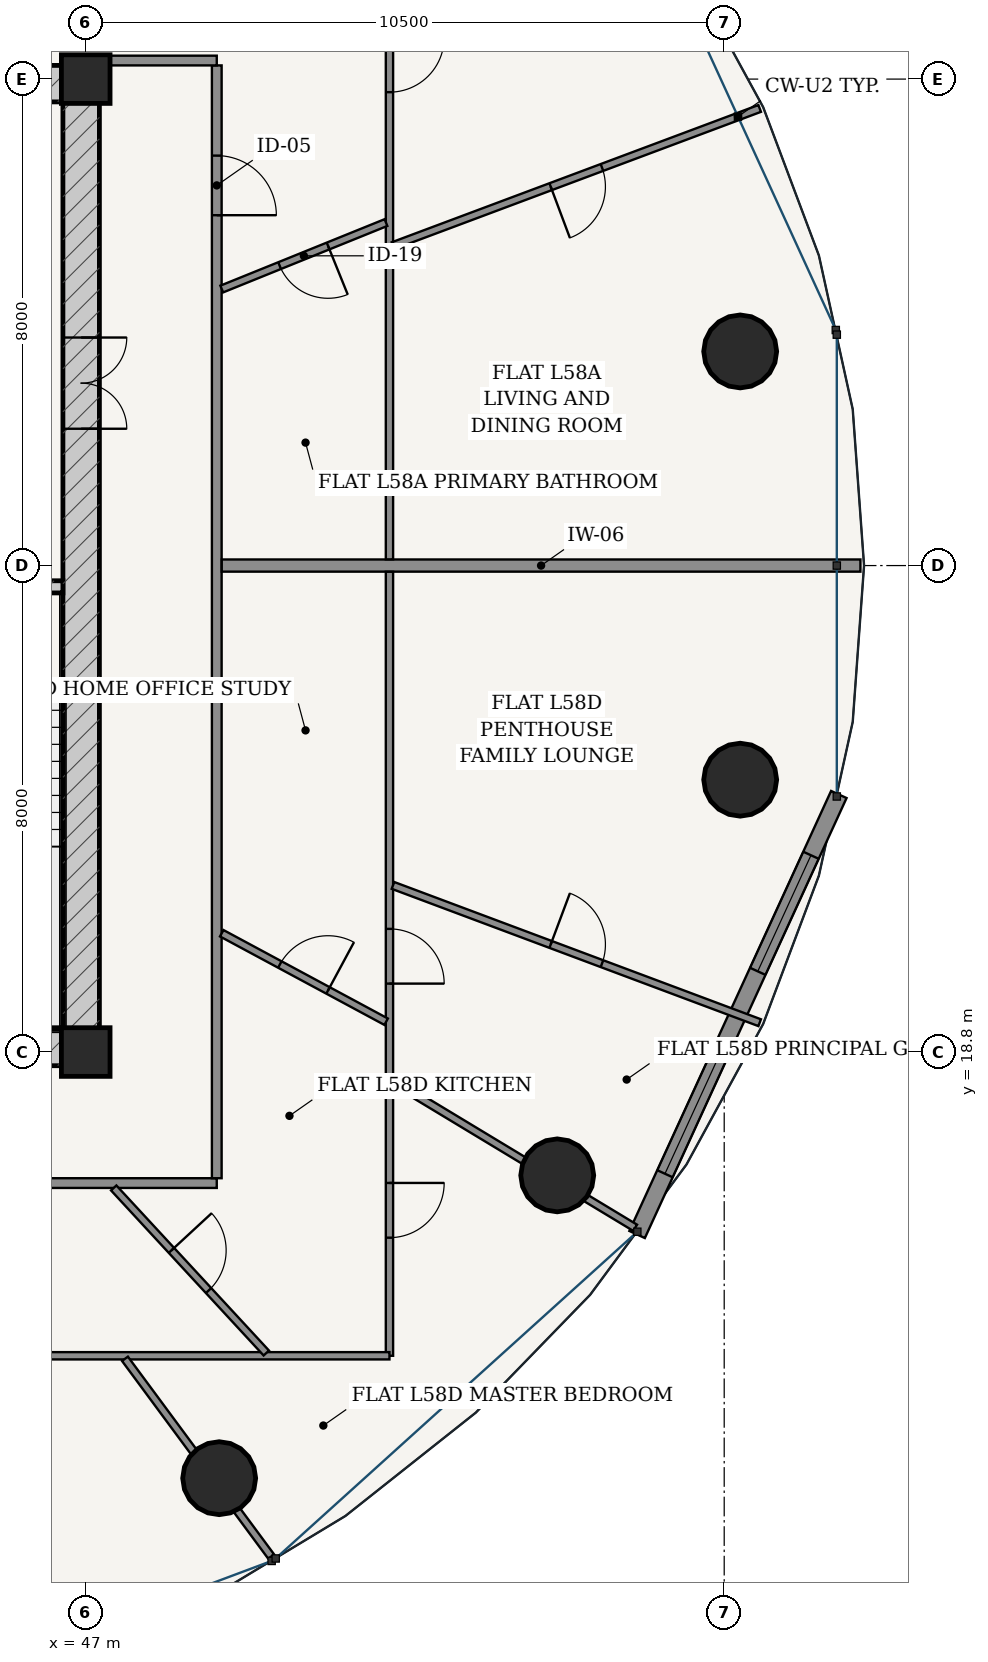
"""IFC4 building model, lengths in metres.
Left out: names, types, materials, properties, quantities, classifications, styles, units other than length and angle.
Written with IfcOpenShell. Run it as: python <this file> out.ifc"""

import sys

from ifc_helpers import new_model, si_unit, direction, frame, frame_2d, origin, origin_2d, place, context, subcontext, project, spatial, rectangle, hollow_circle, extrude, source, transform, mapped, element, fill, save


model = new_model("IFC4")
c1 = context("Model", 3, precision=1e-05, world=origin(), true_north=direction((-0.2419218956, 0.970295726276)))
c2 = subcontext(c1, "Body", "Model", "MODEL_VIEW")
j1 = project(units=[si_unit("LENGTHUNIT", "METRE"), si_unit("PLANEANGLEUNIT", "RADIAN")], contexts=[c1])
p1 = place(None, origin())
s1 = spatial("IfcSite", under=j1, at=p1, CompositionType="ELEMENT")
p2 = place(p1, origin())
s2 = spatial("IfcBuilding", under=s1, at=p2, CompositionType="ELEMENT")
p3 = place(p2, frame((0.0, 0.0, 220.8)))
s3 = spatial("IfcBuildingStorey", under=s2, at=p3, CompositionType="ELEMENT", Elevation=220.8)
for number, where, z_axis, x_axis in (
    (1, (47.0, 18.8, 0.0), (0.0, 0.0, 1.0), (1.0, 0.0, 0.0)),
    (2, (47.0, 34.8, 0.0), (0.0, 0.0, 1.0), (1.0, 0.0, 0.0)),
):
    element("IfcColumn", number, at=place(p3, frame(where, z_axis=z_axis, x_axis=x_axis)), inside=s3, PredefinedType="COLUMN", context=c2, shape_type="SweptSolid", body=[
        extrude(rectangle(XDim=0.8, YDim=0.8, at=origin_2d()), origin(), (0.0, 0.0, 1.0), 3.7),
    ])
p4 = place(p3, frame((28.775, 18.875, 0.0), z_axis=(0.0, 0.0, 1.0), x_axis=(1.0, 0.0, 0.0)))
e3 = element("IfcWall", 3, at=p4, inside=s3, PredefinedType="SHEAR", context=c2, shape_type="SweptSolid", body=[
    extrude(rectangle(XDim=18.45, YDim=0.6, at=frame_2d((9.225, 0.0))), origin(), (0.0, 0.0, 1.0), 3.435),
])
p5 = place(p4, frame((7.46, 0.0, 0.0)))
e4 = element("IfcOpeningElement", 4, at=p5, cuts=e3, PredefinedType="OPENING", context=c2, shape_type="SweptSolid", body=[
    extrude(rectangle(XDim=0.85, YDim=2.1, at=frame_2d((0.425, 1.05))), frame((0.0, 0.31, 0.0), z_axis=(0.0, -1.0, 0.0), x_axis=(1.0, 0.0, 0.0)), (0.0, 0.0, 1.0), 0.62),
])
p6 = place(p4, frame((10.54, 0.0, 0.0)))
e5 = element("IfcOpeningElement", 5, at=p6, cuts=e3, PredefinedType="OPENING", context=c2, shape_type="SweptSolid", body=[
    extrude(rectangle(XDim=0.85, YDim=2.1, at=frame_2d((0.425, 1.05))), frame((0.0, 0.31, 0.0), z_axis=(0.0, -1.0, 0.0), x_axis=(1.0, 0.0, 0.0)), (0.0, 0.0, 1.0), 0.62),
])
p7 = place(p3, frame((28.775, 34.725, 0.0), z_axis=(0.0, 0.0, 1.0), x_axis=(1.0, 0.0, 0.0)))
e6 = element("IfcWall", 6, at=p7, inside=s3, PredefinedType="SHEAR", context=c2, shape_type="SweptSolid", body=[
    extrude(rectangle(XDim=18.45, YDim=0.6, at=frame_2d((9.225, 0.0))), origin(), (0.0, 0.0, 1.0), 3.435),
])
p8 = place(p3, frame((46.925, 19.175, 0.0), z_axis=(0.0, 0.0, 1.0), x_axis=(0.0, 1.0, 0.0)))
e7 = element("IfcWall", 7, at=p8, inside=s3, PredefinedType="SHEAR", context=c2, shape_type="SweptSolid", body=[
    extrude(rectangle(XDim=15.25, YDim=0.6, at=frame_2d((7.625, 0.0))), origin(), (0.0, 0.0, 1.0), 3.435),
])
p9 = place(p8, frame((9.875, 0.0, 0.0)))
e8 = element("IfcOpeningElement", 8, at=p9, cuts=e7, PredefinedType="OPENING", context=c2, shape_type="SweptSolid", body=[
    extrude(rectangle(XDim=1.5, YDim=2.2, at=frame_2d((0.75, 1.1))), frame((0.0, 0.31, 0.0), z_axis=(0.0, -1.0, 0.0), x_axis=(1.0, 0.0, 0.0)), (0.0, 0.0, 1.0), 0.62),
])
p10 = place(p3, frame((43.305, 26.45, 0.0), z_axis=(0.0, 0.0, 1.0), x_axis=(1.0, 0.0, 0.0)))
e9 = element("IfcWall", 9, at=p10, inside=s3, PredefinedType="SOLIDWALL", context=c2, shape_type="SweptSolid", body=[
    extrude(rectangle(XDim=3.32, YDim=0.2, at=frame_2d((1.66, 0.0))), origin(), (0.0, 0.0, 1.0), 3.435),
])
p11 = place(p10, frame((1.185, 0.0, 0.0)))
e10 = element("IfcOpeningElement", 10, at=p11, cuts=e9, PredefinedType="OPENING", context=c2, shape_type="SweptSolid", body=[
    extrude(rectangle(XDim=0.95, YDim=2.15, at=frame_2d((0.475, 1.075))), frame((0.0, 0.11, 0.0), z_axis=(0.0, -1.0, 0.0), x_axis=(1.0, 0.0, 0.0)), (0.0, 0.0, 1.0), 0.22),
])
for number, where, z_axis, x_axis in (
    (11, (57.763, 30.321, 0.0), (0.0, 0.0, 1.0), (1.0, 0.0, 0.0)),
    (12, (49.195, 11.792, 0.0), (0.0, 0.0, 1.0), (1.0, 0.0, 0.0)),
    (13, (54.754, 16.772, 0.0), (0.0, 0.0, 1.0), (1.0, 0.0, 0.0)),
    (14, (57.763, 23.279, 0.0), (0.0, 0.0, 1.0), (1.0, 0.0, 0.0)),
):
    element("IfcColumn", number, at=place(p3, frame(where, z_axis=z_axis, x_axis=x_axis)), inside=s3, PredefinedType="COLUMN", context=c2, shape_type="SweptSolid", body=[
        extrude(hollow_circle(Radius=0.6, WallThickness=0.038, at=origin_2d()), origin(), (0.0, 0.0, 1.0), 3.7),
    ])
p12 = place(p3, frame((56.068, 15.799, 0.0), z_axis=(0.0, 0.0, 1.0), x_axis=(0.416717018135, 0.909036262641, 0.0)))
e15 = element("IfcWall", 15, at=p12, inside=s3, PredefinedType="SOLIDWALL", context=c2, shape_type="SweptSolid", body=[
    extrude(rectangle(XDim=7.96, YDim=0.28, at=frame_2d((3.98, 0.0))), origin(), (0.0, 0.0, 1.0), 3.435),
])
p13 = place(p12, frame((1.099, 0.0, 0.85)))
e16 = element("IfcOpeningElement", 16, at=p13, cuts=e15, PredefinedType="OPENING", context=c2, shape_type="SweptSolid", body=[
    extrude(rectangle(XDim=2.1, YDim=1.95, at=frame_2d((1.05, 0.975))), frame((0.0, 0.15, 0.0), z_axis=(0.0, -1.0, 0.0), x_axis=(1.0, 0.0, 0.0)), (0.0, 0.0, 1.0), 0.3),
])
p14 = place(p12, frame((4.761, 0.0, 0.85)))
e17 = element("IfcOpeningElement", 17, at=p14, cuts=e15, PredefinedType="OPENING", context=c2, shape_type="SweptSolid", body=[
    extrude(rectangle(XDim=2.1, YDim=1.95, at=frame_2d((1.05, 0.975))), frame((0.0, 0.15, 0.0), z_axis=(0.0, -1.0, 0.0), x_axis=(1.0, 0.0, 0.0)), (0.0, 0.0, 1.0), 0.3),
])
p15 = place(p3, frame((34.32, 16.645, 0.0), z_axis=(0.0, 0.0, 1.0), x_axis=(1.0, 0.0, 0.0)))
e18 = element("IfcWall", 18, at=p15, inside=s3, PredefinedType="PARTITIONING", context=c2, shape_type="SweptSolid", body=[
    extrude(rectangle(XDim=14.835, YDim=0.16, at=frame_2d((7.417, 0.0))), origin(), (0.0, 0.0, 1.0), 2.951),
])
p16 = place(p15, frame((8.973, 0.0, 0.0)))
e19 = element("IfcOpeningElement", 19, at=p16, cuts=e18, PredefinedType="OPENING", context=c2, shape_type="SweptSolid", body=[
    extrude(rectangle(XDim=0.98, YDim=2.2, at=frame_2d((0.49, 1.1))), frame((0.0, 0.09, 0.0), z_axis=(0.0, -1.0, 0.0), x_axis=(1.0, 0.0, 0.0)), (0.0, 0.0, 1.0), 0.18),
])
p17 = place(p3, frame((49.155, 16.725, 0.0), z_axis=(0.0, 0.0, 1.0), x_axis=(0.0, 1.0, 0.0)))
e20 = element("IfcWall", 20, at=p17, inside=s3, PredefinedType="PARTITIONING", context=c2, shape_type="SweptSolid", body=[
    extrude(rectangle(XDim=18.3, YDim=0.16, at=frame_2d((9.15, 0.0))), origin(), (0.0, 0.0, 1.0), 2.951),
])
p18 = place(p17, frame((15.837, 0.0, 0.0)))
e21 = element("IfcOpeningElement", 21, at=p18, cuts=e20, PredefinedType="OPENING", context=c2, shape_type="SweptSolid", body=[
    extrude(rectangle(XDim=0.98, YDim=2.2, at=frame_2d((0.49, 1.1))), frame((0.0, 0.09, 0.0), z_axis=(0.0, -1.0, 0.0), x_axis=(1.0, 0.0, 0.0)), (0.0, 0.0, 1.0), 0.18),
])
p19 = place(p3, frame((47.225, 35.105, 0.0), z_axis=(0.0, 0.0, 1.0), x_axis=(1.0, 0.0, 0.0)))
e22 = element("IfcWall", 22, at=p19, inside=s3, PredefinedType="PARTITIONING", context=c2, shape_type="SweptSolid", body=[
    extrude(rectangle(XDim=1.93, YDim=0.16, at=frame_2d((0.965, 0.0))), origin(), (0.0, 0.0, 1.0), 3.435),
])
p20 = place(p3, frame((49.237, 26.8, 0.0), z_axis=(0.0, 0.0, 1.0), x_axis=(1.0, 0.0, 0.0)))
e23 = element("IfcWall", 23, at=p20, inside=s3, PredefinedType="PARTITIONING", context=c2, shape_type="SweptSolid", body=[
    extrude(rectangle(XDim=10.503, YDim=0.2, at=frame_2d((5.251, 0.0))), origin(), (0.0, 0.0, 1.0), 2.951),
])
p21 = place(p3, frame((51.995, 37.945, 0.0), z_axis=(0.0, 0.0, 1.0), x_axis=(0.0, -1.0, 0.0)))
e24 = element("IfcWall", 24, at=p21, inside=s3, PredefinedType="PARTITIONING", context=c2, shape_type="SweptSolid", body=[
    extrude(rectangle(XDim=11.043, YDim=0.12, at=frame_2d((5.521, 0.0))), origin(), (0.0, 0.0, 1.0), 2.951),
])
p22 = place(p21, frame((2.46, 0.0, 0.0)))
e25 = element("IfcOpeningElement", 25, at=p22, cuts=e24, PredefinedType="OPENING", context=c2, shape_type="SweptSolid", body=[
    extrude(rectangle(XDim=0.9, YDim=2.15, at=frame_2d((0.45, 1.075))), frame((0.0, 0.07, 0.0), z_axis=(0.0, -1.0, 0.0), x_axis=(1.0, 0.0, 0.0)), (0.0, 0.0, 1.0), 0.14),
])
p23 = place(p3, frame((52.053, 32.06, 0.0), z_axis=(0.0, 0.0, 1.0), x_axis=(0.936547148815, 0.350541635255, 0.0)))
e26 = element("IfcWall", 26, at=p23, inside=s3, PredefinedType="PARTITIONING", context=c2, shape_type="SweptSolid", body=[
    extrude(rectangle(XDim=6.439, YDim=0.12, at=frame_2d((3.219, 0.0))), origin(), (0.0, 0.0, 1.0), 2.951),
])
p24 = place(p23, frame((2.769, 0.0, 0.0)))
e27 = element("IfcOpeningElement", 27, at=p24, cuts=e26, PredefinedType="OPENING", context=c2, shape_type="SweptSolid", body=[
    extrude(rectangle(XDim=0.9, YDim=2.15, at=frame_2d((0.45, 1.075))), frame((0.0, 0.07, 0.0), z_axis=(0.0, -1.0, 0.0), x_axis=(1.0, 0.0, 0.0)), (0.0, 0.0, 1.0), 0.14),
])
p25 = place(p3, frame((49.237, 31.347, 0.0), z_axis=(0.0, 0.0, 1.0), x_axis=(0.926960690293, 0.375158471383, 0.0)))
e28 = element("IfcWall", 28, at=p25, inside=s3, PredefinedType="PARTITIONING", context=c2, shape_type="SweptSolid", body=[
    extrude(rectangle(XDim=2.914, YDim=0.12, at=frame_2d((1.457, 0.0))), origin(), (0.0, 0.0, 1.0), 3.11),
])
p26 = place(p25, frame((1.027, 0.0, 0.0)))
e29 = element("IfcOpeningElement", 29, at=p26, cuts=e28, PredefinedType="OPENING", context=c2, shape_type="SweptSolid", body=[
    extrude(rectangle(XDim=0.86, YDim=2.15, at=frame_2d((0.43, 1.075))), frame((0.0, 0.07, 0.0), z_axis=(0.0, -1.0, 0.0), x_axis=(1.0, 0.0, 0.0)), (0.0, 0.0, 1.0), 0.14),
])
p27 = place(p3, frame((51.995, 26.698, 0.0), z_axis=(0.0, 0.0, 1.0), x_axis=(0.0, -1.0, 0.0)))
e30 = element("IfcWall", 30, at=p27, inside=s3, PredefinedType="PARTITIONING", context=c2, shape_type="SweptSolid", body=[
    extrude(rectangle(XDim=12.893, YDim=0.12, at=frame_2d((6.447, 0.0))), origin(), (0.0, 0.0, 1.0), 2.951),
])
p28 = place(p27, frame((10.051, 0.0, 0.0)))
e31 = element("IfcOpeningElement", 31, at=p28, cuts=e30, PredefinedType="OPENING", context=c2, shape_type="SweptSolid", body=[
    extrude(rectangle(XDim=0.9, YDim=2.15, at=frame_2d((0.45, 1.075))), frame((0.0, 0.07, 0.0), z_axis=(0.0, -1.0, 0.0), x_axis=(1.0, 0.0, 0.0)), (0.0, 0.0, 1.0), 0.14),
])
p29 = place(p27, frame((5.873, 0.0, 0.0)))
e32 = element("IfcOpeningElement", 32, at=p29, cuts=e30, PredefinedType="OPENING", context=c2, shape_type="SweptSolid", body=[
    extrude(rectangle(XDim=0.9, YDim=2.15, at=frame_2d((0.45, 1.075))), frame((0.0, 0.07, 0.0), z_axis=(0.0, -1.0, 0.0), x_axis=(1.0, 0.0, 0.0)), (0.0, 0.0, 1.0), 0.14),
])
p30 = place(p3, frame((51.995, 13.805, 0.0), z_axis=(0.0, 0.0, 1.0), x_axis=(-1.0, 0.0, 0.0)))
e33 = element("IfcWall", 33, at=p30, inside=s3, PredefinedType="PARTITIONING", context=c2, shape_type="SweptSolid", body=[
    extrude(rectangle(XDim=16.753, YDim=0.12, at=frame_2d((8.377, 0.0))), origin(), (0.0, 0.0, 1.0), 2.951),
])
p31 = place(p30, frame((7.442, 0.0, 0.0)))
e34 = element("IfcOpeningElement", 34, at=p31, cuts=e33, PredefinedType="OPENING", context=c2, shape_type="SweptSolid", body=[
    extrude(rectangle(XDim=0.9, YDim=2.15, at=frame_2d((0.45, 1.075))), frame((0.0, 0.07, 0.0), z_axis=(0.0, -1.0, 0.0), x_axis=(1.0, 0.0, 0.0)), (0.0, 0.0, 1.0), 0.14),
])
p32 = place(p3, frame((47.646, 13.755, 0.0), z_axis=(0.0, 0.0, 1.0), x_axis=(0.594518373783, -0.80408202519, 0.0)))
e35 = element("IfcWall", 35, at=p32, inside=s3, PredefinedType="PARTITIONING", context=c2, shape_type="SweptSolid", body=[
    extrude(rectangle(XDim=4.044, YDim=0.12, at=frame_2d((2.022, 0.0))), origin(), (0.0, 0.0, 1.0), 2.951),
])
p33 = place(p3, frame((52.048, 18.318, 0.0), z_axis=(0.0, 0.0, 1.0), x_axis=(0.856051317976, -0.516890840499, 0.0)))
e36 = element("IfcWall", 36, at=p33, inside=s3, PredefinedType="PARTITIONING", context=c2, shape_type="SweptSolid", body=[
    extrude(rectangle(XDim=4.658, YDim=0.12, at=frame_2d((2.329, 0.0))), origin(), (0.0, 0.0, 1.0), 2.951),
])
p34 = place(p3, frame((52.053, 21.54, 0.0), z_axis=(0.0, 0.0, 1.0), x_axis=(0.936534700322, -0.350574892274, 0.0)))
e37 = element("IfcWall", 37, at=p34, inside=s3, PredefinedType="PARTITIONING", context=c2, shape_type="SweptSolid", body=[
    extrude(rectangle(XDim=6.439, YDim=0.12, at=frame_2d((3.219, 0.0))), origin(), (0.0, 0.0, 1.0), 2.951),
])
p35 = place(p34, frame((2.769, 0.0, 0.0)))
e38 = element("IfcOpeningElement", 38, at=p35, cuts=e37, PredefinedType="OPENING", context=c2, shape_type="SweptSolid", body=[
    extrude(rectangle(XDim=0.9, YDim=2.15, at=frame_2d((0.45, 1.075))), frame((0.0, 0.07, 0.0), z_axis=(0.0, -1.0, 0.0), x_axis=(1.0, 0.0, 0.0)), (0.0, 0.0, 1.0), 0.14),
])
p36 = place(p3, frame((47.46, 16.565, 0.0), z_axis=(0.0, 0.0, 1.0), x_axis=(0.678787443458, -0.734334805524, 0.0)))
e39 = element("IfcWall", 39, at=p36, inside=s3, PredefinedType="PARTITIONING", context=c2, shape_type="SweptSolid", body=[
    extrude(rectangle(XDim=3.696, YDim=0.12, at=frame_2d((1.848, 0.0))), origin(), (0.0, 0.0, 1.0), 2.951),
])
p37 = place(p36, frame((1.398, 0.0, 0.0)))
e40 = element("IfcOpeningElement", 40, at=p37, cuts=e39, PredefinedType="OPENING", context=c2, shape_type="SweptSolid", body=[
    extrude(rectangle(XDim=0.9, YDim=2.15, at=frame_2d((0.45, 1.075))), frame((0.0, 0.07, 0.0), z_axis=(0.0, -1.0, 0.0), x_axis=(1.0, 0.0, 0.0)), (0.0, 0.0, 1.0), 0.14),
])
p38 = place(p3, frame((49.237, 20.753, 0.0), z_axis=(0.0, 0.0, 1.0), x_axis=(0.880601289356, -0.473857963091, 0.0)))
e41 = element("IfcWall", 41, at=p38, inside=s3, PredefinedType="PARTITIONING", context=c2, shape_type="SweptSolid", body=[
    extrude(rectangle(XDim=3.07, YDim=0.12, at=frame_2d((1.535, 0.0))), origin(), (0.0, 0.0, 1.0), 3.11),
])
p39 = place(p38, frame((1.085, 0.0, 0.0)))
e42 = element("IfcOpeningElement", 42, at=p39, cuts=e41, PredefinedType="OPENING", context=c2, shape_type="SweptSolid", body=[
    extrude(rectangle(XDim=0.9, YDim=2.15, at=frame_2d((0.45, 1.075))), frame((0.0, 0.07, 0.0), z_axis=(0.0, -1.0, 0.0), x_axis=(1.0, 0.0, 0.0)), (0.0, 0.0, 1.0), 0.14),
])
m1 = source(origin(), c2, "Body", "SweptSolid", [
    extrude(rectangle(XDim=2.1, YDim=1.95, at=frame_2d((1.05, 0.975))), frame((0.0, 0.03, 0.0), z_axis=(0.0, -1.0, 0.0), x_axis=(1.0, 0.0, 0.0)), (0.0, 0.0, 1.0), 0.06),
])
p40 = place(p13, origin())
e43 = element("IfcWindow", 43, at=p40, inside=s3, PartitioningType="SINGLE_PANEL", PredefinedType="WINDOW", context=c2, shape_type="MappedRepresentation", body=[
    mapped(m1, transform((0.0, 0.0, 0.0), scale=1.0)),
])
fill(e16, e43)
p41 = place(p14, origin())
e44 = element("IfcWindow", 44, at=p41, inside=s3, PartitioningType="SINGLE_PANEL", PredefinedType="WINDOW", context=c2, shape_type="MappedRepresentation", body=[
    mapped(m1, transform((0.0, 0.0, 0.0), scale=1.0)),
])
fill(e17, e44)
m2 = source(origin(), c2, "Body", "SweptSolid", [
    extrude(rectangle(XDim=1.5, YDim=2.2, at=frame_2d((0.75, 1.1))), frame((0.0, 0.025, 0.0), z_axis=(0.0, -1.0, 0.0), x_axis=(1.0, 0.0, 0.0)), (0.0, 0.0, 1.0), 0.05),
])
p42 = place(p9, frame((1.5, 0.0, 0.0), z_axis=(0.0, 0.0, 1.0), x_axis=(-1.0, 0.0, 0.0)))
e45 = element("IfcDoor", 45, at=p42, inside=s3, OperationType="DOUBLE_DOOR_SINGLE_SWING", PredefinedType="DOOR", context=c2, shape_type="MappedRepresentation", body=[
    mapped(m2, transform((0.0, 0.0, 0.0), scale=1.0)),
])
fill(e8, e45)
m3 = source(origin(), c2, "Body", "SweptSolid", [
    extrude(rectangle(XDim=0.98, YDim=2.2, at=frame_2d((0.49, 1.1))), frame((0.0, 0.025, 0.0), z_axis=(0.0, -1.0, 0.0), x_axis=(1.0, 0.0, 0.0)), (0.0, 0.0, 1.0), 0.05),
])
p43 = place(p18, frame((0.98, 0.0, 0.0), z_axis=(0.0, 0.0, 1.0), x_axis=(-1.0, 0.0, 0.0)))
e46 = element("IfcDoor", 46, at=p43, inside=s3, OperationType="SINGLE_SWING_RIGHT", PredefinedType="DOOR", context=c2, shape_type="MappedRepresentation", body=[
    mapped(m3, transform((0.0, 0.0, 0.0), scale=1.0)),
])
fill(e21, e46)
m4 = source(origin(), c2, "Body", "SweptSolid", [
    extrude(rectangle(XDim=0.86, YDim=2.15, at=frame_2d((0.43, 1.075))), frame((0.0, 0.025, 0.0), z_axis=(0.0, -1.0, 0.0), x_axis=(1.0, 0.0, 0.0)), (0.0, 0.0, 1.0), 0.05),
])
p44 = place(p26, frame((0.86, 0.0, 0.0), z_axis=(0.0, 0.0, 1.0), x_axis=(-1.0, 0.0, 0.0)))
e47 = element("IfcDoor", 47, at=p44, inside=s3, OperationType="SINGLE_SWING_LEFT", PredefinedType="DOOR", context=c2, shape_type="MappedRepresentation", body=[
    mapped(m4, transform((0.0, 0.0, 0.0), scale=1.0)),
])
fill(e29, e47)
m5 = source(origin(), c2, "Body", "SweptSolid", [
    extrude(rectangle(XDim=0.9, YDim=2.15, at=frame_2d((0.45, 1.075))), frame((0.0, 0.025, 0.0), z_axis=(0.0, -1.0, 0.0), x_axis=(1.0, 0.0, 0.0)), (0.0, 0.0, 1.0), 0.05),
])
p45 = place(p22, origin())
e48 = element("IfcDoor", 48, at=p45, inside=s3, OperationType="SINGLE_SWING_LEFT", PredefinedType="DOOR", context=c2, shape_type="MappedRepresentation", body=[
    mapped(m5, transform((0.0, 0.0, 0.0), scale=1.0)),
])
fill(e25, e48)
p46 = place(p24, frame((0.9, 0.0, 0.0), z_axis=(0.0, 0.0, 1.0), x_axis=(-1.0, 0.0, 0.0)))
e49 = element("IfcDoor", 49, at=p46, inside=s3, OperationType="SINGLE_SWING_RIGHT", PredefinedType="DOOR", context=c2, shape_type="MappedRepresentation", body=[
    mapped(m5, transform((0.0, 0.0, 0.0), scale=1.0)),
])
fill(e27, e49)
p47 = place(p37, origin())
e50 = element("IfcDoor", 50, at=p47, inside=s3, OperationType="SINGLE_SWING_LEFT", PredefinedType="DOOR", context=c2, shape_type="MappedRepresentation", body=[
    mapped(m5, transform((0.0, 0.0, 0.0), scale=1.0)),
])
fill(e40, e50)
p48 = place(p39, origin())
e51 = element("IfcDoor", 51, at=p48, inside=s3, OperationType="SINGLE_SWING_RIGHT", PredefinedType="DOOR", context=c2, shape_type="MappedRepresentation", body=[
    mapped(m5, transform((0.0, 0.0, 0.0), scale=1.0)),
])
fill(e42, e51)
p49 = place(p28, origin())
e52 = element("IfcDoor", 52, at=p49, inside=s3, OperationType="SINGLE_SWING_LEFT", PredefinedType="DOOR", context=c2, shape_type="MappedRepresentation", body=[
    mapped(m5, transform((0.0, 0.0, 0.0), scale=1.0)),
])
fill(e31, e52)
p50 = place(p29, origin())
e53 = element("IfcDoor", 53, at=p50, inside=s3, OperationType="SINGLE_SWING_RIGHT", PredefinedType="DOOR", context=c2, shape_type="MappedRepresentation", body=[
    mapped(m5, transform((0.0, 0.0, 0.0), scale=1.0)),
])
fill(e32, e53)
p51 = place(p35, origin())
e54 = element("IfcDoor", 54, at=p51, inside=s3, OperationType="SINGLE_SWING_LEFT", PredefinedType="DOOR", context=c2, shape_type="MappedRepresentation", body=[
    mapped(m5, transform((0.0, 0.0, 0.0), scale=1.0)),
])
fill(e38, e54)
save(model, sys.argv[1])
